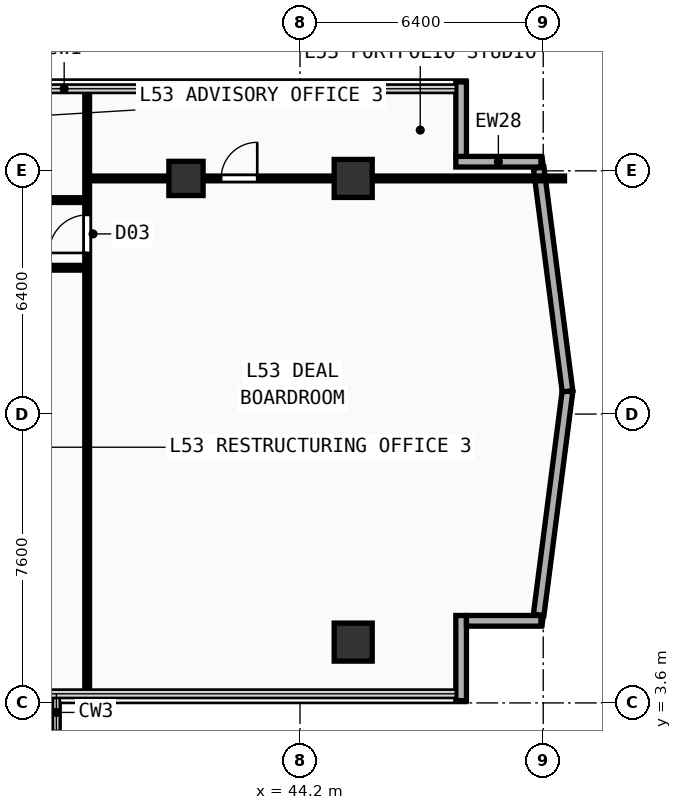
"""IFC4 building model, lengths in metres.
Left out: names, types, materials, properties, quantities, classifications, styles, units other than length and angle.
Written with IfcOpenShell. Run it as: python <this file> out.ifc"""

import sys

from ifc_helpers import new_model, si_unit, direction, frame, frame_2d, origin, origin_2d, place, context, subcontext, project, spatial, rectangle, extrude, element, fill, save


model = new_model("IFC4")
c1 = context("Model", 3, precision=1e-05, world=origin(), true_north=direction((0.0, 1.0)))
c2 = subcontext(c1, "Body", "Model", "MODEL_VIEW")
j1 = project(units=[si_unit("LENGTHUNIT", "METRE"), si_unit("PLANEANGLEUNIT", "RADIAN")], contexts=[c1])
p1 = place(None, origin())
s1 = spatial("IfcSite", under=j1, at=p1, CompositionType="ELEMENT")
p2 = place(p1, origin())
s2 = spatial("IfcBuilding", under=s1, at=p2, CompositionType="ELEMENT")
p3 = place(p2, frame((0.0, 0.0, 208.3)))
s3 = spatial("IfcBuildingStorey", under=s2, at=p3, CompositionType="ELEMENT", Elevation=208.3)
for number, where, z_axis, x_axis in (
    (1, (45.6, 5.2, 0.0), (0.0, 0.0, 1.0), (1.0, 0.0, 0.0)),
    (2, (45.6, 17.4, 0.0), (0.0, 0.0, 1.0), (1.0, 0.0, 0.0)),
):
    element("IfcColumn", number, at=place(p3, frame(where, z_axis=z_axis, x_axis=x_axis)), inside=s3, PredefinedType="COLUMN", context=c2, shape_type="SweptSolid", body=[
        extrude(rectangle(XDim=1.0, YDim=1.0, at=origin_2d()), origin(), (0.0, 0.0, 1.0), 3.56),
    ])
p4 = place(p3, frame((41.2, 17.4, 0.0), z_axis=(0.0, 0.0, 1.0), x_axis=(1.0, 0.0, 0.0)))
e3 = element("IfcColumn", 3, at=p4, inside=s3, PredefinedType="COLUMN", context=c2, shape_type="SweptSolid", body=[
    extrude(rectangle(XDim=0.9, YDim=0.9, at=origin_2d()), origin(), (0.0, 0.0, 1.0), 3.56),
])
p5 = place(p3, frame((48.44, 3.66, 0.0), z_axis=(0.0, 0.0, 1.0), x_axis=(0.0, 1.0, 0.0)))
e4 = element("IfcWall", 4, at=p5, inside=s3, PredefinedType="SOLIDWALL", context=c2, shape_type="SweptSolid", body=[
    extrude(rectangle(XDim=2.24, YDim=0.28, at=frame_2d((1.12, 0.0))), origin(), (0.0, 0.0, 1.0), 3.56),
])
p6 = place(p3, frame((48.58, 5.76, 0.0), z_axis=(0.0, 0.0, 1.0), x_axis=(1.0, 0.0, 0.0)))
e5 = element("IfcWall", 5, at=p6, inside=s3, PredefinedType="SOLIDWALL", context=c2, shape_type="SweptSolid", body=[
    extrude(rectangle(XDim=1.96, YDim=0.28, at=frame_2d((0.98, 0.0))), origin(), (0.0, 0.0, 1.0), 3.56),
])
p7 = place(p3, frame((48.44, 17.965, 0.0), z_axis=(0.0, 0.0, 1.0), x_axis=(0.0, 1.0, 0.0)))
e6 = element("IfcWall", 6, at=p7, inside=s3, PredefinedType="SOLIDWALL", context=c2, shape_type="SweptSolid", body=[
    extrude(rectangle(XDim=1.975, YDim=0.28, at=frame_2d((0.987, 0.0))), origin(), (0.0, 0.0, 1.0), 3.56),
])
p8 = place(p3, frame((48.3, 17.84, 0.0), z_axis=(0.0, 0.0, 1.0), x_axis=(1.0, 0.0, 0.0)))
e7 = element("IfcWall", 7, at=p8, inside=s3, PredefinedType="SOLIDWALL", context=c2, shape_type="SweptSolid", body=[
    extrude(rectangle(XDim=2.24, YDim=0.28, at=frame_2d((1.12, 0.0))), origin(), (0.0, 0.0, 1.0), 3.56),
])
for number, where, z_axis, x_axis in (
    (8, (50.48, 5.918, 0.0), (0.0, 0.0, 1.0), (0.128, 0.992, 0.0)),
    (9, (51.239, 11.799, 0.0), (0.0, 0.0, 1.0), (-0.128, 0.992, 0.0)),
):
    element("IfcWall", number, at=place(p3, frame(where, z_axis=z_axis, x_axis=x_axis)), inside=s3, PredefinedType="SOLIDWALL", context=c2, shape_type="SweptSolid", body=[
        extrude(rectangle(XDim=5.931, YDim=0.28, at=frame_2d((2.966, 0.0))), origin(), (0.0, 0.0, 1.0), 3.56),
    ])
p9 = place(p3, frame((23.7, 15.05, 0.0), z_axis=(0.0, 0.0, 1.0), x_axis=(1.0, 0.0, 0.0)))
e10 = element("IfcWall", 10, at=p9, inside=s3, PredefinedType="PARTITIONING", context=c2, shape_type="SweptSolid", body=[
    extrude(rectangle(XDim=14.9, YDim=0.125, at=frame_2d((7.45, 0.0))), origin(), (0.0, 0.0, 1.0), 3.56),
])
p10 = place(p9, frame((1.985, 0.0, 0.0)))
e11 = element("IfcOpeningElement", 11, at=p10, cuts=e10, PredefinedType="OPENING", context=c2, shape_type="SweptSolid", body=[
    extrude(rectangle(XDim=0.95, YDim=2.15, at=frame_2d((0.475, 1.075))), frame((0.0, 0.073, 0.0), z_axis=(0.0, -1.0, 0.0), x_axis=(1.0, 0.0, 0.0)), (0.0, 0.0, 1.0), 0.145),
])
p11 = place(p9, frame((6.903, 0.0, 0.0)))
e12 = element("IfcOpeningElement", 12, at=p11, cuts=e10, PredefinedType="OPENING", context=c2, shape_type="SweptSolid", body=[
    extrude(rectangle(XDim=0.95, YDim=2.15, at=frame_2d((0.475, 1.075))), frame((0.0, 0.073, 0.0), z_axis=(0.0, -1.0, 0.0), x_axis=(1.0, 0.0, 0.0)), (0.0, 0.0, 1.0), 0.145),
])
p12 = place(p9, frame((11.416, 0.0, 0.0)))
e13 = element("IfcOpeningElement", 13, at=p12, cuts=e10, PredefinedType="OPENING", context=c2, shape_type="SweptSolid", body=[
    extrude(rectangle(XDim=0.95, YDim=2.15, at=frame_2d((0.475, 1.075))), frame((0.0, 0.073, 0.0), z_axis=(0.0, -1.0, 0.0), x_axis=(1.0, 0.0, 0.0)), (0.0, 0.0, 1.0), 0.145),
])
p13 = place(p3, frame((38.6, 3.84, 0.0), z_axis=(0.0, 0.0, 1.0), x_axis=(0.0, 1.0, 0.0)))
e14 = element("IfcWall", 14, at=p13, inside=s3, PredefinedType="PARTITIONING", context=c2, shape_type="SweptSolid", body=[
    extrude(rectangle(XDim=15.92, YDim=0.125, at=frame_2d((7.96, 0.0))), origin(), (0.0, 0.0, 1.0), 3.56),
])
p14 = place(p13, frame((11.6, 0.0, 0.0)))
e15 = element("IfcOpeningElement", 15, at=p14, cuts=e14, PredefinedType="OPENING", context=c2, shape_type="SweptSolid", body=[
    extrude(rectangle(XDim=1.0, YDim=2.2, at=frame_2d((0.5, 1.1))), frame((0.0, 0.073, 0.0), z_axis=(0.0, -1.0, 0.0), x_axis=(1.0, 0.0, 0.0)), (0.0, 0.0, 1.0), 0.145),
])
p15 = place(p3, frame((38.6, 17.4, 0.0), z_axis=(0.0, 0.0, 1.0), x_axis=(1.0, 0.0, 0.0)))
e16 = element("IfcWall", 16, at=p15, inside=s3, PredefinedType="PARTITIONING", context=c2, shape_type="SweptSolid", body=[
    extrude(rectangle(XDim=12.56, YDim=0.125, at=frame_2d((6.28, 0.0))), origin(), (0.0, 0.0, 1.0), 3.26),
])
p16 = place(p15, frame((3.525, 0.0, 0.0)))
e17 = element("IfcOpeningElement", 17, at=p16, cuts=e16, PredefinedType="OPENING", context=c2, shape_type="SweptSolid", body=[
    extrude(rectangle(XDim=0.95, YDim=2.15, at=frame_2d((0.475, 1.075))), frame((0.0, 0.073, 0.0), z_axis=(0.0, -1.0, 0.0), x_axis=(1.0, 0.0, 0.0)), (0.0, 0.0, 1.0), 0.145),
])
p17 = place(p3, frame((23.65, 16.83, 0.0), z_axis=(0.0, 0.0, 1.0), x_axis=(1.0, 0.0, 0.0)))
e18 = element("IfcWall", 18, at=p17, inside=s3, PredefinedType="PARTITIONING", context=c2, shape_type="SweptSolid", body=[
    extrude(rectangle(XDim=14.95, YDim=0.125, at=frame_2d((7.475, 0.0))), origin(), (0.0, 0.0, 1.0), 3.56),
])
p18 = place(p17, frame((1.548, 0.0, 0.0)))
e19 = element("IfcOpeningElement", 19, at=p18, cuts=e18, PredefinedType="OPENING", context=c2, shape_type="SweptSolid", body=[
    extrude(rectangle(XDim=0.95, YDim=2.15, at=frame_2d((0.475, 1.075))), frame((0.0, 0.073, 0.0), z_axis=(0.0, -1.0, 0.0), x_axis=(1.0, 0.0, 0.0)), (0.0, 0.0, 1.0), 0.145),
])
p19 = place(p17, frame((6.333, 0.0, 0.0)))
e20 = element("IfcOpeningElement", 20, at=p19, cuts=e18, PredefinedType="OPENING", context=c2, shape_type="SweptSolid", body=[
    extrude(rectangle(XDim=0.95, YDim=2.15, at=frame_2d((0.475, 1.075))), frame((0.0, 0.073, 0.0), z_axis=(0.0, -1.0, 0.0), x_axis=(1.0, 0.0, 0.0)), (0.0, 0.0, 1.0), 0.145),
])
p20 = place(p17, frame((11.277, 0.0, 0.0)))
e21 = element("IfcOpeningElement", 21, at=p20, cuts=e18, PredefinedType="OPENING", context=c2, shape_type="SweptSolid", body=[
    extrude(rectangle(XDim=0.95, YDim=2.15, at=frame_2d((0.475, 1.075))), frame((0.0, 0.073, 0.0), z_axis=(0.0, -1.0, 0.0), x_axis=(1.0, 0.0, 0.0)), (0.0, 0.0, 1.0), 0.145),
])
p21 = place(p14, origin())
e22 = element("IfcDoor", 22, at=p21, inside=s3, OperationType="SINGLE_SWING_LEFT", PredefinedType="DOOR", context=c2, shape_type="SweptSolid", body=[
    extrude(rectangle(XDim=1.0, YDim=2.2, at=frame_2d((0.5, 1.1))), frame((0.0, 0.025, 0.0), z_axis=(0.0, -1.0, 0.0), x_axis=(1.0, 0.0, 0.0)), (0.0, 0.0, 1.0), 0.05),
])
fill(e15, e22)
p22 = place(p16, origin())
e23 = element("IfcDoor", 23, at=p22, inside=s3, OperationType="SINGLE_SWING_RIGHT", PredefinedType="DOOR", context=c2, shape_type="SweptSolid", body=[
    extrude(rectangle(XDim=0.95, YDim=2.15, at=frame_2d((0.475, 1.075))), frame((0.0, 0.025, 0.0), z_axis=(0.0, -1.0, 0.0), x_axis=(1.0, 0.0, 0.0)), (0.0, 0.0, 1.0), 0.05),
])
fill(e17, e23)
save(model, sys.argv[1])
